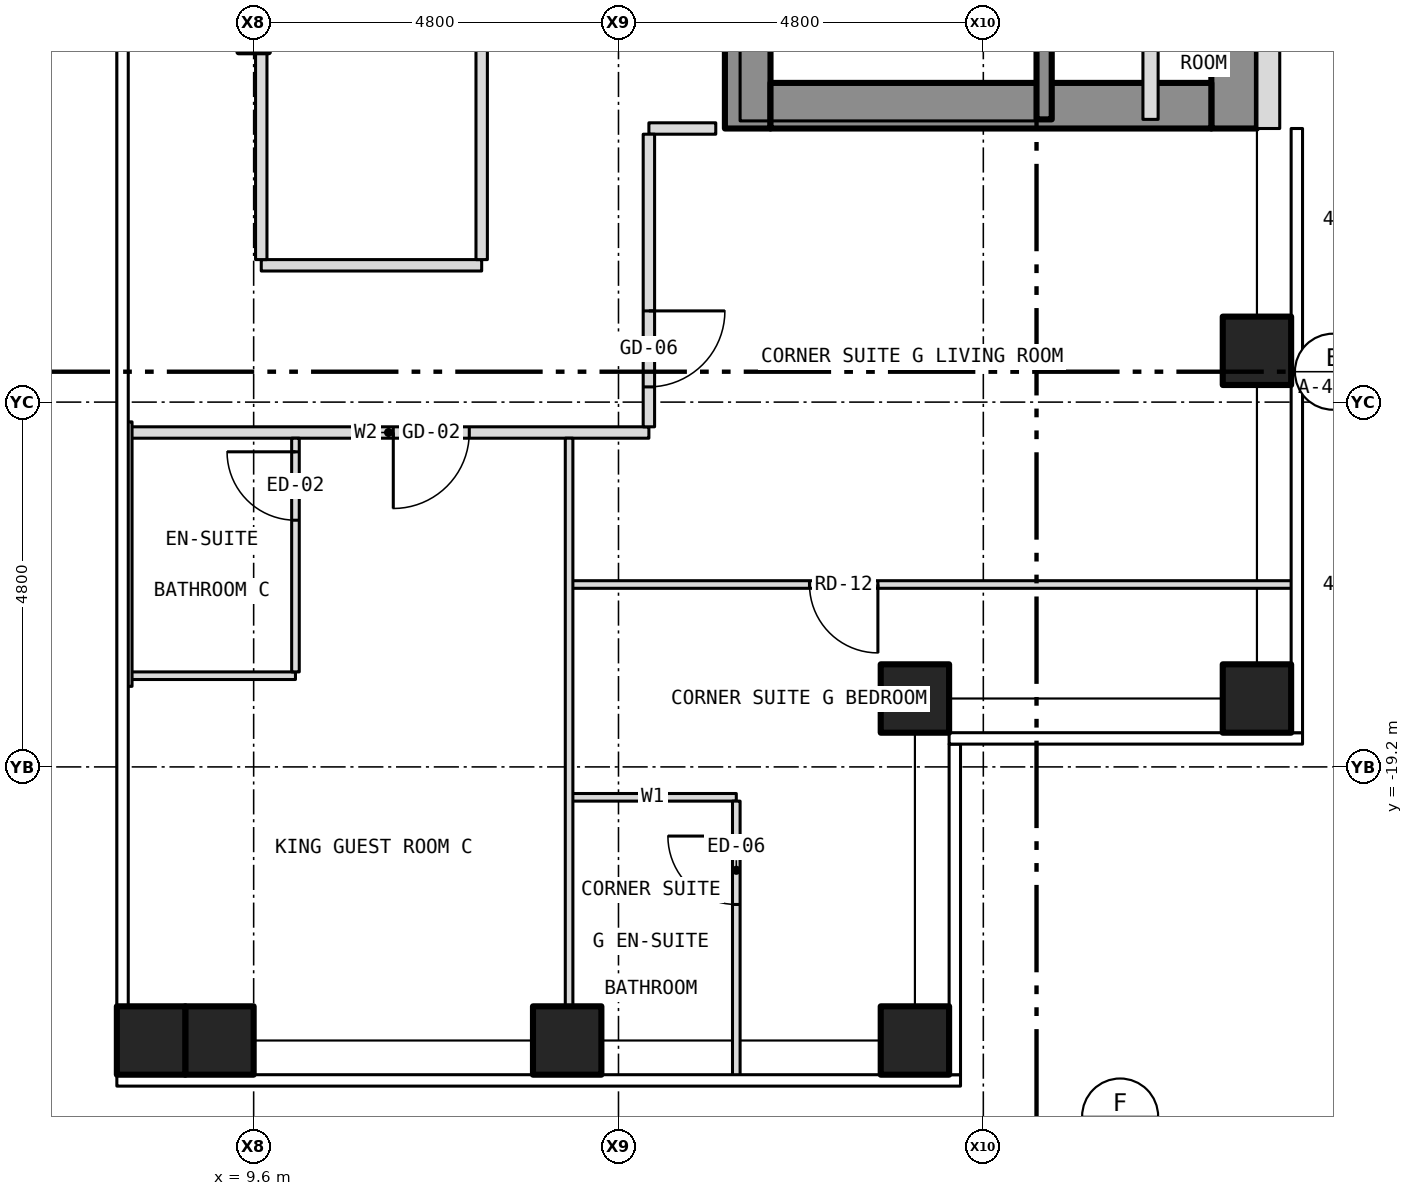
"""IFC4 building model, lengths in metres.
Left out: names, types, materials, properties, quantities, classifications, styles, units other than length and angle.
Written with IfcOpenShell. Run it as: python <this file> out.ifc"""

import sys

from ifc_helpers import new_model, si_unit, direction, frame, frame_2d, origin, origin_2d, place, context, subcontext, project, spatial, rectangle, hollow_rectangle, extrude, element, fill, save


model = new_model("IFC4")
c1 = context("Model", 3, precision=1e-05, world=origin(), true_north=direction((0.0, 1.0)))
c2 = subcontext(c1, "Body", "Model", "MODEL_VIEW")
j1 = project(units=[si_unit("LENGTHUNIT", "METRE"), si_unit("PLANEANGLEUNIT", "RADIAN")], contexts=[c1])
p1 = place(None, origin())
s1 = spatial("IfcSite", under=j1, at=p1, CompositionType="ELEMENT")
p2 = place(p1, origin())
s2 = spatial("IfcBuilding", under=s1, at=p2, CompositionType="ELEMENT")
p3 = place(p2, frame((0.0, 0.0, 134.5)))
s3 = spatial("IfcBuildingStorey", under=s2, at=p3, CompositionType="ELEMENT", Elevation=134.5)
for number, where, z_axis, x_axis in (
    (1, (9.15, -22.8, -0.15), (0.0, 0.0, 1.0), (1.0, 0.0, 0.0)),
    (2, (13.725, -22.8, -0.15), (0.0, 0.0, 1.0), (1.0, 0.0, 0.0)),
    (3, (18.3, -22.8, -0.15), (0.0, 0.0, 1.0), (1.0, 0.0, 0.0)),
    (4, (22.8, -18.3, -0.15), (0.0, 0.0, 1.0), (1.0, 0.0, 0.0)),
    (5, (22.8, -13.725, -0.15), (0.0, 0.0, 1.0), (1.0, 0.0, 0.0)),
    (6, (18.3, -18.3, -0.15), (0.0, 0.0, 1.0), (1.0, 0.0, 0.0)),
    (7, (8.25, -22.8, -0.15), (0.0, 0.0, 1.0), (1.0, 0.0, 0.0)),
):
    element("IfcColumn", number, at=place(p3, frame(where, z_axis=z_axis, x_axis=x_axis)), inside=s3, PredefinedType="COLUMN", context=c2, shape_type="SweptSolid", body=[
        extrude(hollow_rectangle(XDim=0.9, YDim=0.9, WallThickness=0.05, at=origin_2d()), origin(), (0.0, 0.0, 1.0), 3.35),
    ])
p4 = place(p3, frame((16.1, -10.8, 0.0), z_axis=(0.0, 0.0, 1.0), x_axis=(0.0, 1.0, 0.0)))
e8 = element("IfcWall", 8, at=p4, inside=s3, PredefinedType="SHEAR", context=c2, shape_type="SweptSolid", body=[
    extrude(rectangle(XDim=21.6, YDim=0.6, at=frame_2d((10.8, 0.0))), origin(), (0.0, 0.0, 1.0), 2.9),
])
p5 = place(p4, frame((9.4, 0.0, 0.0)))
e9 = element("IfcOpeningElement", 9, at=p5, cuts=e8, PredefinedType="OPENING", context=c2, shape_type="SweptSolid", body=[
    extrude(rectangle(XDim=1.1, YDim=2.1, at=frame_2d((0.55, 1.05))), frame((0.0, 0.312, 0.0), z_axis=(0.0, -1.0, 0.0), x_axis=(1.0, 0.0, 0.0)), (0.0, 0.0, 1.0), 0.624),
])
p6 = place(p4, frame((11.5, 0.0, 0.0)))
e10 = element("IfcOpeningElement", 10, at=p6, cuts=e8, PredefinedType="OPENING", context=c2, shape_type="SweptSolid", body=[
    extrude(rectangle(XDim=1.1, YDim=2.1, at=frame_2d((0.55, 1.05))), frame((0.0, 0.312, 0.0), z_axis=(0.0, -1.0, 0.0), x_axis=(1.0, 0.0, 0.0)), (0.0, 0.0, 1.0), 0.624),
])
p7 = place(p4, frame((13.6, 0.0, 0.0)))
e11 = element("IfcOpeningElement", 11, at=p7, cuts=e8, PredefinedType="OPENING", context=c2, shape_type="SweptSolid", body=[
    extrude(rectangle(XDim=1.1, YDim=2.1, at=frame_2d((0.55, 1.05))), frame((0.0, 0.312, 0.0), z_axis=(0.0, -1.0, 0.0), x_axis=(1.0, 0.0, 0.0)), (0.0, 0.0, 1.0), 0.624),
])
p8 = place(p4, frame((15.7, 0.0, 0.0)))
e12 = element("IfcOpeningElement", 12, at=p8, cuts=e8, PredefinedType="OPENING", context=c2, shape_type="SweptSolid", body=[
    extrude(rectangle(XDim=1.1, YDim=2.1, at=frame_2d((0.55, 1.05))), frame((0.0, 0.312, 0.0), z_axis=(0.0, -1.0, 0.0), x_axis=(1.0, 0.0, 0.0)), (0.0, 0.0, 1.0), 0.624),
])
p9 = place(p4, frame((17.8, 0.0, 0.0)))
e13 = element("IfcOpeningElement", 13, at=p9, cuts=e8, PredefinedType="OPENING", context=c2, shape_type="SweptSolid", body=[
    extrude(rectangle(XDim=1.1, YDim=2.1, at=frame_2d((0.55, 1.05))), frame((0.0, 0.312, 0.0), z_axis=(0.0, -1.0, 0.0), x_axis=(1.0, 0.0, 0.0)), (0.0, 0.0, 1.0), 0.624),
])
p10 = place(p4, frame((5.642, 0.0, 0.0)))
e14 = element("IfcOpeningElement", 14, at=p10, cuts=e8, PredefinedType="OPENING", context=c2, shape_type="SweptSolid", body=[
    extrude(rectangle(XDim=1.1, YDim=2.1, at=frame_2d((0.55, 1.05))), frame((0.0, 0.312, 0.0), z_axis=(0.0, -1.0, 0.0), x_axis=(1.0, 0.0, 0.0)), (0.0, 0.0, 1.0), 0.624),
])
p11 = place(p4, frame((7.5, 0.0, 0.0)))
e15 = element("IfcOpeningElement", 15, at=p11, cuts=e8, PredefinedType="OPENING", context=c2, shape_type="SweptSolid", body=[
    extrude(rectangle(XDim=1.1, YDim=2.1, at=frame_2d((0.55, 1.05))), frame((0.0, 0.312, 0.0), z_axis=(0.0, -1.0, 0.0), x_axis=(1.0, 0.0, 0.0)), (0.0, 0.0, 1.0), 0.624),
])
p12 = place(p3, frame((22.5, -10.8, 0.0), z_axis=(0.0, 0.0, 1.0), x_axis=(0.0, 1.0, 0.0)))
e16 = element("IfcWall", 16, at=p12, inside=s3, PredefinedType="SHEAR", context=c2, shape_type="SweptSolid", body=[
    extrude(rectangle(XDim=21.6, YDim=0.6, at=frame_2d((10.8, 0.0))), origin(), (0.0, 0.0, 1.0), 2.9),
])
p13 = place(p3, frame((16.4, -10.5, 0.0), z_axis=(0.0, 0.0, 1.0), x_axis=(1.0, 0.0, 0.0)))
e17 = element("IfcWall", 17, at=p13, inside=s3, PredefinedType="SHEAR", context=c2, shape_type="SweptSolid", body=[
    extrude(rectangle(XDim=5.8, YDim=0.6, at=frame_2d((2.9, 0.0))), origin(), (0.0, 0.0, 1.0), 2.9),
])
p14 = place(p3, frame((22.95, -10.8, 0.0), z_axis=(0.0, 0.0, 1.0), x_axis=(0.0, 1.0, 0.0)))
e18 = element("IfcWall", 18, at=p14, inside=s3, PredefinedType="SOLIDWALL", context=c2, shape_type="SweptSolid", body=[
    extrude(rectangle(XDim=21.6, YDim=0.3, at=frame_2d((10.8, 0.0))), origin(), (0.0, 0.0, 1.0), 3.5),
])
p15 = place(p14, frame((2.95, 0.0, 1.0)))
e19 = element("IfcOpeningElement", 19, at=p15, cuts=e18, PredefinedType="OPENING", context=c2, shape_type="SweptSolid", body=[
    extrude(rectangle(XDim=0.6, YDim=1.5, at=frame_2d((0.3, 0.75))), frame((0.0, 0.162, 0.0), z_axis=(0.0, -1.0, 0.0), x_axis=(1.0, 0.0, 0.0)), (0.0, 0.0, 1.0), 0.324),
])
for number, where, z_axis, x_axis in (
    (20, (13.75, -19.6, 0.0), (0.0, 0.0, 1.0), (1.0, 0.0, 0.0)),
    (21, (7.95, -18.0, 0.0), (0.0, 0.0, 1.0), (1.0, 0.0, 0.0)),
):
    element("IfcWall", number, at=place(p3, frame(where, z_axis=z_axis, x_axis=x_axis)), inside=s3, PredefinedType="PARTITIONING", context=c2, shape_type="SweptSolid", body=[
        extrude(rectangle(XDim=2.2, YDim=0.1, at=frame_2d((1.1, 0.0))), origin(), (0.0, 0.0, 1.0), 3.2),
    ])
p16 = place(p3, frame((13.75, -16.8, 0.0), z_axis=(0.0, 0.0, 1.0), x_axis=(1.0, 0.0, 0.0)))
e22 = element("IfcWall", 22, at=p16, inside=s3, PredefinedType="PARTITIONING", context=c2, shape_type="SweptSolid", body=[
    extrude(rectangle(XDim=9.53, YDim=0.1, at=frame_2d((4.765, 0.0))), origin(), (0.0, 0.0, 1.0), 3.2),
])
p17 = place(p16, frame((3.163, 0.0, 0.0)))
e23 = element("IfcOpeningElement", 23, at=p17, cuts=e22, PredefinedType="OPENING", context=c2, shape_type="SweptSolid", body=[
    extrude(rectangle(XDim=0.9, YDim=2.1, at=frame_2d((0.45, 1.05))), frame((0.0, 0.062, 0.0), z_axis=(0.0, -1.0, 0.0), x_axis=(1.0, 0.0, 0.0)), (0.0, 0.0, 1.0), 0.124),
])
p18 = place(p3, frame((7.95, -14.8, 0.0), z_axis=(0.0, 0.0, 1.0), x_axis=(1.0, 0.0, 0.0)))
e24 = element("IfcWall", 24, at=p18, inside=s3, PredefinedType="PARTITIONING", context=c2, shape_type="SweptSolid", body=[
    extrude(rectangle(XDim=6.85, YDim=0.15, at=frame_2d((3.425, 0.0))), origin(), (0.0, 0.0, 1.0), 3.2),
])
p19 = place(p18, frame((3.487, 0.0, 0.0)))
e25 = element("IfcOpeningElement", 25, at=p19, cuts=e24, PredefinedType="OPENING", context=c2, shape_type="SweptSolid", body=[
    extrude(rectangle(XDim=1.0, YDim=2.1, at=frame_2d((0.5, 1.05))), frame((0.0, 0.087, 0.0), z_axis=(0.0, -1.0, 0.0), x_axis=(1.0, 0.0, 0.0)), (0.0, 0.0, 1.0), 0.174),
])
p20 = place(p3, frame((9.7, -12.6, 0.0), z_axis=(0.0, 0.0, 1.0), x_axis=(1.0, 0.0, 0.0)))
e26 = element("IfcWall", 26, at=p20, inside=s3, PredefinedType="PARTITIONING", context=c2, shape_type="SweptSolid", body=[
    extrude(rectangle(XDim=2.9, YDim=0.15, at=frame_2d((1.45, 0.0))), origin(), (0.0, 0.0, 1.0), 3.2),
])
p21 = place(p3, frame((14.8, -10.8, 0.0), z_axis=(0.0, 0.0, 1.0), x_axis=(1.0, 0.0, 0.0)))
e27 = element("IfcWall", 27, at=p21, inside=s3, PredefinedType="PARTITIONING", context=c2, shape_type="SweptSolid", body=[
    extrude(rectangle(XDim=0.88, YDim=0.15, at=frame_2d((0.44, 0.0))), origin(), (0.0, 0.0, 1.0), 3.2),
])
p22 = place(p3, frame((7.95, -18.14, 0.0), z_axis=(0.0, 0.0, 1.0), x_axis=(0.0, 1.0, 0.0)))
e28 = element("IfcWall", 28, at=p22, inside=s3, PredefinedType="PARTITIONING", context=c2, shape_type="SweptSolid", body=[
    extrude(rectangle(XDim=3.48, YDim=0.1, at=frame_2d((1.74, 0.0))), origin(), (0.0, 0.0, 1.0), 3.2),
])
p23 = place(p3, frame((9.7, -12.525, 0.0), z_axis=(0.0, 0.0, 1.0), x_axis=(0.0, 1.0, 0.0)))
e29 = element("IfcWall", 29, at=p23, inside=s3, PredefinedType="PARTITIONING", context=c2, shape_type="SweptSolid", body=[
    extrude(rectangle(XDim=2.725, YDim=0.15, at=frame_2d((1.362, 0.0))), origin(), (0.0, 0.0, 1.0), 2.578),
])
p24 = place(p3, frame((10.15, -17.95, 0.0), z_axis=(0.0, 0.0, 1.0), x_axis=(0.0, 1.0, 0.0)))
e30 = element("IfcWall", 30, at=p24, inside=s3, PredefinedType="PARTITIONING", context=c2, shape_type="SweptSolid", body=[
    extrude(rectangle(XDim=3.075, YDim=0.1, at=frame_2d((1.538, 0.0))), origin(), (0.0, 0.0, 1.0), 3.2),
])
p25 = place(p24, frame((1.996, 0.0, 0.0)))
e31 = element("IfcOpeningElement", 31, at=p25, cuts=e30, PredefinedType="OPENING", context=c2, shape_type="SweptSolid", body=[
    extrude(rectangle(XDim=0.9, YDim=2.1, at=frame_2d((0.45, 1.05))), frame((0.0, 0.062, 0.0), z_axis=(0.0, -1.0, 0.0), x_axis=(1.0, 0.0, 0.0)), (0.0, 0.0, 1.0), 0.124),
])
p26 = place(p3, frame((12.6, -12.525, 0.0), z_axis=(0.0, 0.0, 1.0), x_axis=(0.0, 1.0, 0.0)))
e32 = element("IfcWall", 32, at=p26, inside=s3, PredefinedType="PARTITIONING", context=c2, shape_type="SweptSolid", body=[
    extrude(rectangle(XDim=10.525, YDim=0.15, at=frame_2d((5.262, 0.0))), origin(), (0.0, 0.0, 1.0), 3.2),
])
p27 = place(p3, frame((13.75, -22.68, 0.0), z_axis=(0.0, 0.0, 1.0), x_axis=(0.0, 1.0, 0.0)))
e33 = element("IfcWall", 33, at=p27, inside=s3, PredefinedType="PARTITIONING", context=c2, shape_type="SweptSolid", body=[
    extrude(rectangle(XDim=7.805, YDim=0.1, at=frame_2d((3.902, 0.0))), origin(), (0.0, 0.0, 1.0), 3.2),
])
p28 = place(p3, frame((14.8, -14.725, 0.0), z_axis=(0.0, 0.0, 1.0), x_axis=(0.0, 1.0, 0.0)))
e34 = element("IfcWall", 34, at=p28, inside=s3, PredefinedType="PARTITIONING", context=c2, shape_type="SweptSolid", body=[
    extrude(rectangle(XDim=3.85, YDim=0.15, at=frame_2d((1.925, 0.0))), origin(), (0.0, 0.0, 1.0), 3.2),
])
p29 = place(p28, frame((0.525, 0.0, 0.0)))
e35 = element("IfcOpeningElement", 35, at=p29, cuts=e34, PredefinedType="OPENING", context=c2, shape_type="SweptSolid", body=[
    extrude(rectangle(XDim=1.0, YDim=2.1, at=frame_2d((0.5, 1.05))), frame((0.0, 0.087, 0.0), z_axis=(0.0, -1.0, 0.0), x_axis=(1.0, 0.0, 0.0)), (0.0, 0.0, 1.0), 0.174),
])
p30 = place(p3, frame((15.95, -23.28, 0.0), z_axis=(0.0, 0.0, 1.0), x_axis=(0.0, 1.0, 0.0)))
e36 = element("IfcWall", 36, at=p30, inside=s3, PredefinedType="PARTITIONING", context=c2, shape_type="SweptSolid", body=[
    extrude(rectangle(XDim=3.63, YDim=0.1, at=frame_2d((1.815, 0.0))), origin(), (0.0, 0.0, 1.0), 3.2),
])
p31 = place(p30, frame((2.27, 0.0, 0.0)))
e37 = element("IfcOpeningElement", 37, at=p31, cuts=e36, PredefinedType="OPENING", context=c2, shape_type="SweptSolid", body=[
    extrude(rectangle(XDim=0.9, YDim=2.1, at=frame_2d((0.45, 1.05))), frame((0.0, 0.062, 0.0), z_axis=(0.0, -1.0, 0.0), x_axis=(1.0, 0.0, 0.0)), (0.0, 0.0, 1.0), 0.124),
])
p32 = place(p3, frame((20.0, -10.68, 0.0), z_axis=(0.0, 0.0, 1.0), x_axis=(0.0, 1.0, 0.0)))
e38 = element("IfcWall", 38, at=p32, inside=s3, PredefinedType="SHEAR", context=c2, shape_type="SweptSolid", body=[
    extrude(rectangle(XDim=6.98, YDim=0.2, at=frame_2d((3.49, 0.0))), origin(), (0.0, 0.0, 1.0), 2.9),
])
p33 = place(p3, frame((21.4, -10.68, 0.0), z_axis=(0.0, 0.0, 1.0), x_axis=(0.0, 1.0, 0.0)))
e39 = element("IfcWall", 39, at=p33, inside=s3, PredefinedType="PARTITIONING", context=c2, shape_type="SweptSolid", body=[
    extrude(rectangle(XDim=8.68, YDim=0.2, at=frame_2d((4.34, 0.0))), origin(), (0.0, 0.0, 1.0), 2.9),
])
p34 = place(p33, frame((1.21, 0.0, 0.0)))
e40 = element("IfcOpeningElement", 40, at=p34, cuts=e39, PredefinedType="OPENING", context=c2, shape_type="SweptSolid", body=[
    extrude(rectangle(XDim=0.9, YDim=2.1, at=frame_2d((0.45, 1.05))), frame((0.0, 0.112, 0.0), z_axis=(0.0, -1.0, 0.0), x_axis=(1.0, 0.0, 0.0)), (0.0, 0.0, 1.0), 0.224),
])
p35 = place(p33, frame((5.66, 0.0, 0.0)))
e41 = element("IfcOpeningElement", 41, at=p35, cuts=e39, PredefinedType="OPENING", context=c2, shape_type="SweptSolid", body=[
    extrude(rectangle(XDim=0.9, YDim=2.1, at=frame_2d((0.45, 1.05))), frame((0.0, 0.112, 0.0), z_axis=(0.0, -1.0, 0.0), x_axis=(1.0, 0.0, 0.0)), (0.0, 0.0, 1.0), 0.224),
])
p36 = place(p19, origin())
e42 = element("IfcDoor", 42, at=p36, inside=s3, OperationType="SINGLE_SWING_LEFT", PredefinedType="DOOR", context=c2, shape_type="SweptSolid", body=[
    extrude(rectangle(XDim=1.0, YDim=2.1, at=frame_2d((0.5, 1.05))), frame((0.0, 0.025, 0.0), z_axis=(0.0, -1.0, 0.0), x_axis=(1.0, 0.0, 0.0)), (0.0, 0.0, 1.0), 0.05),
])
fill(e25, e42)
p37 = place(p25, origin())
e43 = element("IfcDoor", 43, at=p37, inside=s3, OperationType="SINGLE_SWING_RIGHT", PredefinedType="DOOR", context=c2, shape_type="SweptSolid", body=[
    extrude(rectangle(XDim=0.9, YDim=2.1, at=frame_2d((0.45, 1.05))), frame((0.0, 0.025, 0.0), z_axis=(0.0, -1.0, 0.0), x_axis=(1.0, 0.0, 0.0)), (0.0, 0.0, 1.0), 0.05),
])
fill(e31, e43)
p38 = place(p29, origin())
e44 = element("IfcDoor", 44, at=p38, inside=s3, OperationType="SINGLE_SWING_RIGHT", PredefinedType="DOOR", context=c2, shape_type="SweptSolid", body=[
    extrude(rectangle(XDim=1.0, YDim=2.1, at=frame_2d((0.5, 1.05))), frame((0.0, 0.025, 0.0), z_axis=(0.0, -1.0, 0.0), x_axis=(1.0, 0.0, 0.0)), (0.0, 0.0, 1.0), 0.05),
])
fill(e35, e44)
p39 = place(p17, origin())
e45 = element("IfcDoor", 45, at=p39, inside=s3, OperationType="SINGLE_SWING_RIGHT", PredefinedType="DOOR", context=c2, shape_type="SweptSolid", body=[
    extrude(rectangle(XDim=0.9, YDim=2.1, at=frame_2d((0.45, 1.05))), frame((0.0, 0.025, 0.0), z_axis=(0.0, -1.0, 0.0), x_axis=(1.0, 0.0, 0.0)), (0.0, 0.0, 1.0), 0.05),
])
fill(e23, e45)
p40 = place(p31, origin())
e46 = element("IfcDoor", 46, at=p40, inside=s3, OperationType="SINGLE_SWING_RIGHT", PredefinedType="DOOR", context=c2, shape_type="SweptSolid", body=[
    extrude(rectangle(XDim=0.9, YDim=2.1, at=frame_2d((0.45, 1.05))), frame((0.0, 0.025, 0.0), z_axis=(0.0, -1.0, 0.0), x_axis=(1.0, 0.0, 0.0)), (0.0, 0.0, 1.0), 0.05),
])
fill(e37, e46)
save(model, sys.argv[1])
